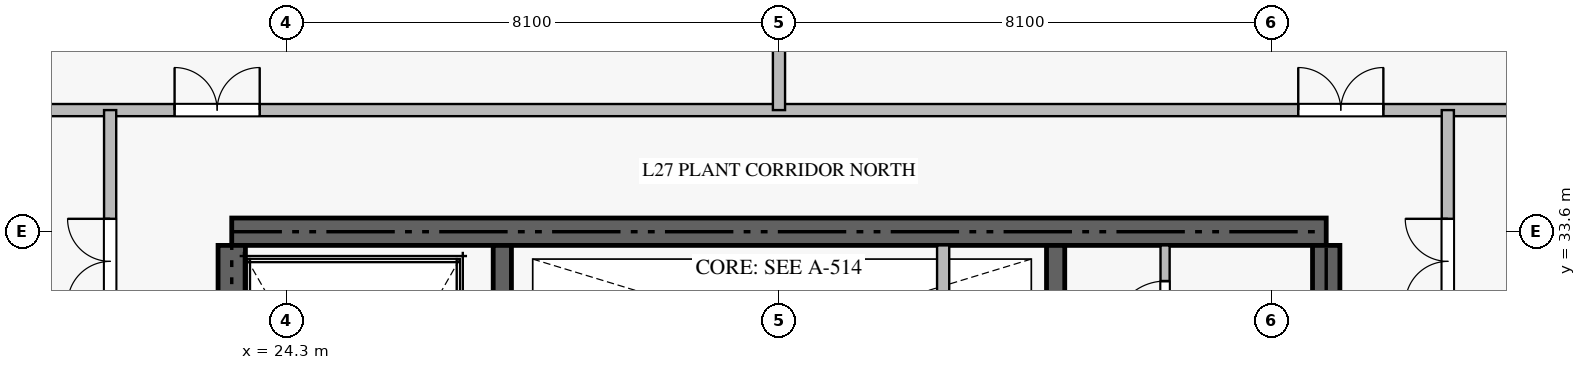
"""IFC4 building model, lengths in metres.
Left out: names, types, materials, properties, quantities, classifications, styles, units other than length and angle.
Written with IfcOpenShell. Run it as: python <this file> out.ifc"""

import sys

from ifc_helpers import new_model, si_unit, direction, frame, frame_2d, origin, place, context, subcontext, project, spatial, rectangle, extrude, source, transform, mapped, element, fill, save


model = new_model("IFC4")
c1 = context("Model", 3, precision=1e-05, world=origin(), true_north=direction((0.0, 1.0)))
c2 = subcontext(c1, "Body", "Model", "MODEL_VIEW")
j1 = project(units=[si_unit("LENGTHUNIT", "METRE"), si_unit("PLANEANGLEUNIT", "RADIAN")], contexts=[c1])
p1 = place(None, origin())
s1 = spatial("IfcSite", under=j1, at=p1, CompositionType="ELEMENT")
p2 = place(p1, origin())
s2 = spatial("IfcBuilding", under=s1, at=p2, CompositionType="ELEMENT")
p3 = place(p2, frame((0.0, 0.0, 109.2)))
s3 = spatial("IfcBuildingStorey", under=s2, at=p3, CompositionType="ELEMENT", Elevation=109.2)
p4 = place(p3, frame((41.4, 33.6, -0.36), z_axis=(0.0, 0.0, 1.0), x_axis=(-1.0, 0.0, 0.0)))
e1 = element("IfcWall", 1, at=p4, inside=s3, PredefinedType="SHEAR", context=c2, shape_type="SweptSolid", body=[
    extrude(rectangle(XDim=18.0, YDim=0.45, at=frame_2d((9.0, 0.0))), origin(), (0.0, 0.0, 1.0), 5.998),
])
p5 = place(p3, frame((23.4, 24.25, -0.36), z_axis=(0.0, 0.0, 1.0), x_axis=(0.0, 1.0, 0.0)))
e2 = element("IfcWall", 2, at=p5, inside=s3, PredefinedType="SHEAR", context=c2, shape_type="SweptSolid", body=[
    extrude(rectangle(XDim=9.125, YDim=0.45, at=frame_2d((4.562, 0.0))), origin(), (0.0, 0.0, 1.0), 5.998),
])
p6 = place(p3, frame((41.4, 27.75, -0.36), z_axis=(0.0, 0.0, 1.0), x_axis=(0.0, 1.0, 0.0)))
e3 = element("IfcWall", 3, at=p6, inside=s3, PredefinedType="SHEAR", context=c2, shape_type="SweptSolid", body=[
    extrude(rectangle(XDim=5.625, YDim=0.45, at=frame_2d((2.812, 0.0))), origin(), (0.0, 0.0, 1.0), 5.998),
])
p7 = place(p3, frame((27.85, 23.55, -0.36), z_axis=(0.0, 0.0, 1.0), x_axis=(0.0, 1.0, 0.0)))
e4 = element("IfcWall", 4, at=p7, inside=s3, PredefinedType="SHEAR", context=c2, shape_type="SweptSolid", body=[
    extrude(rectangle(XDim=9.825, YDim=0.3, at=frame_2d((4.913, 0.0))), origin(), (0.0, 0.0, 1.0), 5.998),
])
p8 = place(p3, frame((36.95, 27.05, -0.36), z_axis=(0.0, 0.0, 1.0), x_axis=(0.0, 1.0, 0.0)))
e5 = element("IfcWall", 5, at=p8, inside=s3, PredefinedType="SHEAR", context=c2, shape_type="SweptSolid", body=[
    extrude(rectangle(XDim=6.325, YDim=0.3, at=frame_2d((3.163, 0.0))), origin(), (0.0, 0.0, 1.0), 5.998),
])
p9 = place(p3, frame((35.1, 30.75, 0.0), z_axis=(0.0, 0.0, 1.0), x_axis=(0.0, 1.0, 0.0)))
e6 = element("IfcWall", 6, at=p9, inside=s3, PredefinedType="STANDARD", context=c2, shape_type="SweptSolid", body=[
    extrude(rectangle(XDim=2.625, YDim=0.2, at=frame_2d((1.312, 0.0))), origin(), (0.0, 0.0, 1.0), 5.64),
])
p10 = place(p3, frame((38.75, 31.352, 0.0), z_axis=(0.0, 0.0, 1.0), x_axis=(0.0, 1.0, 0.0)))
e7 = element("IfcWall", 7, at=p10, inside=s3, PredefinedType="PARTITIONING", context=c2, shape_type="SweptSolid", body=[
    extrude(rectangle(XDim=2.023, YDim=0.15, at=frame_2d((1.011, 0.0))), origin(), (0.0, 0.0, 1.0), 5.64),
])
p11 = place(p10, frame((0.586, 0.0, 0.0)))
e8 = element("IfcOpeningElement", 8, at=p11, cuts=e7, PredefinedType="OPENING", context=c2, shape_type="SweptSolid", body=[
    extrude(rectangle(XDim=0.85, YDim=2.1, at=frame_2d((0.425, 1.05))), frame((0.0, 0.085, 0.0), z_axis=(0.0, -1.0, 0.0), x_axis=(1.0, 0.0, 0.0)), (0.0, 0.0, 1.0), 0.17),
])
p12 = place(p3, frame((15.2, 35.6, 0.0), z_axis=(0.0, 0.0, 1.0), x_axis=(1.0, 0.0, 0.0)))
e9 = element("IfcWall", 9, at=p12, inside=s3, PredefinedType="STANDARD", context=c2, shape_type="SweptSolid", body=[
    extrude(rectangle(XDim=34.4, YDim=0.2, at=frame_2d((17.2, 0.0))), origin(), (0.0, 0.0, 1.0), 5.64),
])
p13 = place(p12, frame((7.26, 0.0, 0.0)))
e10 = element("IfcOpeningElement", 10, at=p13, cuts=e9, PredefinedType="OPENING", context=c2, shape_type="SweptSolid", body=[
    extrude(rectangle(XDim=1.4, YDim=2.2, at=frame_2d((0.7, 1.1))), frame((0.0, 0.11, 0.0), z_axis=(0.0, -1.0, 0.0), x_axis=(1.0, 0.0, 0.0)), (0.0, 0.0, 1.0), 0.22),
])
p14 = place(p12, frame((25.74, 0.0, 0.0)))
e11 = element("IfcOpeningElement", 11, at=p14, cuts=e9, PredefinedType="OPENING", context=c2, shape_type="SweptSolid", body=[
    extrude(rectangle(XDim=1.4, YDim=2.2, at=frame_2d((0.7, 1.1))), frame((0.0, 0.11, 0.0), z_axis=(0.0, -1.0, 0.0), x_axis=(1.0, 0.0, 0.0)), (0.0, 0.0, 1.0), 0.22),
])
p15 = place(p3, frame((32.4, 35.6, 0.0), z_axis=(0.0, 0.0, 1.0), x_axis=(0.0, 1.0, 0.0)))
e12 = element("IfcWall", 12, at=p15, inside=s3, PredefinedType="STANDARD", context=c2, shape_type="SweptSolid", body=[
    extrude(rectangle(XDim=5.8, YDim=0.2, at=frame_2d((2.9, 0.0))), origin(), (0.0, 0.0, 1.0), 5.64),
])
p16 = place(p3, frame((21.4, 26.75, 0.0), z_axis=(0.0, 0.0, 1.0), x_axis=(0.0, 1.0, 0.0)))
e13 = element("IfcWall", 13, at=p16, inside=s3, PredefinedType="STANDARD", context=c2, shape_type="SweptSolid", body=[
    extrude(rectangle(XDim=8.85, YDim=0.2, at=frame_2d((4.425, 0.0))), origin(), (0.0, 0.0, 1.0), 5.64),
])
p17 = place(p16, frame((5.662, 0.0, 0.0)))
e14 = element("IfcOpeningElement", 14, at=p17, cuts=e13, PredefinedType="OPENING", context=c2, shape_type="SweptSolid", body=[
    extrude(rectangle(XDim=1.4, YDim=2.2, at=frame_2d((0.7, 1.1))), frame((0.0, 0.11, 0.0), z_axis=(0.0, -1.0, 0.0), x_axis=(1.0, 0.0, 0.0)), (0.0, 0.0, 1.0), 0.22),
])
p18 = place(p3, frame((43.4, 26.75, 0.0), z_axis=(0.0, 0.0, 1.0), x_axis=(0.0, 1.0, 0.0)))
e15 = element("IfcWall", 15, at=p18, inside=s3, PredefinedType="STANDARD", context=c2, shape_type="SweptSolid", body=[
    extrude(rectangle(XDim=8.85, YDim=0.2, at=frame_2d((4.425, 0.0))), origin(), (0.0, 0.0, 1.0), 5.64),
])
p19 = place(p18, frame((5.662, 0.0, 0.0)))
e16 = element("IfcOpeningElement", 16, at=p19, cuts=e15, PredefinedType="OPENING", context=c2, shape_type="SweptSolid", body=[
    extrude(rectangle(XDim=1.4, YDim=2.2, at=frame_2d((0.7, 1.1))), frame((0.0, 0.11, 0.0), z_axis=(0.0, -1.0, 0.0), x_axis=(1.0, 0.0, 0.0)), (0.0, 0.0, 1.0), 0.22),
])
m1 = source(origin(), c2, "Body", "SweptSolid", [
    extrude(rectangle(XDim=0.85, YDim=2.1, at=frame_2d((0.425, 1.05))), frame((0.0, 0.025, 0.0), z_axis=(0.0, -1.0, 0.0), x_axis=(1.0, 0.0, 0.0)), (0.0, 0.0, 1.0), 0.05),
])
p20 = place(p11, origin())
e17 = element("IfcDoor", 17, at=p20, inside=s3, OperationType="SINGLE_SWING_LEFT", PredefinedType="DOOR", context=c2, shape_type="MappedRepresentation", body=[
    mapped(m1, transform((0.0, 0.0, 0.0), scale=1.0)),
])
fill(e8, e17)
m2 = source(origin(), c2, "Body", "SweptSolid", [
    extrude(rectangle(XDim=1.4, YDim=2.2, at=frame_2d((0.7, 1.1))), frame((0.0, 0.025, 0.0), z_axis=(0.0, -1.0, 0.0), x_axis=(1.0, 0.0, 0.0)), (0.0, 0.0, 1.0), 0.05),
])
p21 = place(p13, origin())
e18 = element("IfcDoor", 18, at=p21, inside=s3, OperationType="DOUBLE_DOOR_SINGLE_SWING", PredefinedType="DOOR", context=c2, shape_type="MappedRepresentation", body=[
    mapped(m2, transform((0.0, 0.0, 0.0), scale=1.0)),
])
fill(e10, e18)
p22 = place(p14, origin())
e19 = element("IfcDoor", 19, at=p22, inside=s3, OperationType="DOUBLE_DOOR_SINGLE_SWING", PredefinedType="DOOR", context=c2, shape_type="MappedRepresentation", body=[
    mapped(m2, transform((0.0, 0.0, 0.0), scale=1.0)),
])
fill(e11, e19)
p23 = place(p17, origin())
e20 = element("IfcDoor", 20, at=p23, inside=s3, OperationType="DOUBLE_DOOR_SINGLE_SWING", PredefinedType="DOOR", context=c2, shape_type="MappedRepresentation", body=[
    mapped(m2, transform((0.0, 0.0, 0.0), scale=1.0)),
])
fill(e14, e20)
p24 = place(p19, origin())
e21 = element("IfcDoor", 21, at=p24, inside=s3, OperationType="DOUBLE_DOOR_SINGLE_SWING", PredefinedType="DOOR", context=c2, shape_type="MappedRepresentation", body=[
    mapped(m2, transform((0.0, 0.0, 0.0), scale=1.0)),
])
fill(e16, e21)
save(model, sys.argv[1])
